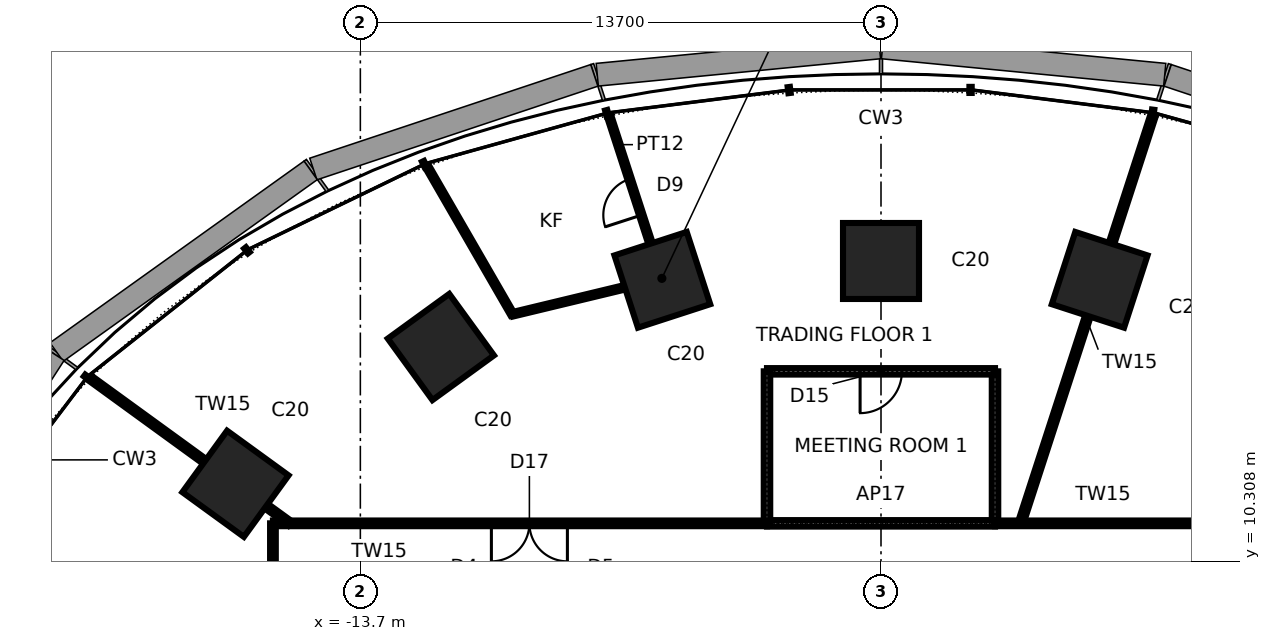
"""IFC4 building model, lengths in metres.
Left out: names, types, materials, properties, quantities, classifications, styles, units other than length and angle.
Written with IfcOpenShell. Run it as: python <this file> out.ifc"""

import sys

from ifc_helpers import new_model, si_unit, direction, frame, frame_2d, origin, origin_2d, place, context, subcontext, project, spatial, rectangle, extrude, element, fill, save


model = new_model("IFC4")
c1 = context("Model", 3, precision=1e-05, world=origin(), true_north=direction((0.0, 1.0)))
c2 = subcontext(c1, "Body", "Model", "MODEL_VIEW")
j1 = project(units=[si_unit("LENGTHUNIT", "METRE"), si_unit("PLANEANGLEUNIT", "RADIAN")], contexts=[c1])
p1 = place(None, origin())
s1 = spatial("IfcSite", under=j1, at=p1, CompositionType="ELEMENT")
p2 = place(p1, origin())
s2 = spatial("IfcBuilding", under=s1, at=p2, CompositionType="ELEMENT")
p3 = place(p2, frame((0.0, 0.0, 65.8)))
s3 = spatial("IfcBuildingStorey", under=s2, at=p3, CompositionType="ELEMENT", Elevation=65.8)
for number, where, z_axis, x_axis in (
    (1, (5.754, 17.708, 0.0), (0.0, 0.0, 1.0), (0.309, 0.951, 0.0)),
    (2, (0.0, 18.204, 0.0), (0.0, 0.0, 1.0), (0.0, 1.0, 0.0)),
    (3, (-5.754, 17.708, 0.0), (0.0, 0.0, 1.0), (-0.309, 0.951, 0.0)),
    (4, (-11.581, 15.94, 0.0), (0.0, 0.0, 1.0), (-0.588, 0.809, 0.0)),
    (5, (-16.986, 12.341, 0.0), (0.0, 0.0, 1.0), (-0.809, 0.588, 0.0)),
):
    element("IfcColumn", number, at=place(p3, frame(where, z_axis=z_axis, x_axis=x_axis)), inside=s3, PredefinedType="COLUMN", context=c2, shape_type="SweptSolid", body=[
        extrude(rectangle(XDim=2.0, YDim=2.0, at=origin_2d()), origin(), (0.0, 0.0, 1.0), 4.2),
    ])
p4 = place(p3, frame((16.0, 11.3, 0.0), z_axis=(0.0, 0.0, 1.0), x_axis=(-1.0, 0.0, 0.0)))
e6 = element("IfcWall", 6, at=p4, inside=s3, PredefinedType="PARTITIONING", context=c2, shape_type="SweptSolid", body=[
    extrude(rectangle(XDim=13.0, YDim=0.15, at=frame_2d((6.5, 0.0))), origin(), (0.0, 0.0, 1.0), 4.04),
])
p5 = place(p4, frame((5.164, 0.0, 0.0)))
e7 = element("IfcOpeningElement", 7, at=p5, cuts=e6, PredefinedType="OPENING", context=c2, shape_type="SweptSolid", body=[
    extrude(rectangle(XDim=2.0, YDim=2.4, at=frame_2d((1.0, 1.2))), frame((0.0, 0.085, 0.0), z_axis=(0.0, -1.0, 0.0), x_axis=(1.0, 0.0, 0.0)), (0.0, 0.0, 1.0), 0.17),
])
p6 = place(p3, frame((7.157, 22.026, 0.0), z_axis=(0.0, 0.0, 1.0), x_axis=(-0.309010203018, -0.951058722914, 0.0)))
e8 = element("IfcWall", 8, at=p6, inside=s3, PredefinedType="PARTITIONING", context=c2, shape_type="SweptSolid", body=[
    extrude(rectangle(XDim=11.278, YDim=0.15, at=frame_2d((5.639, 0.0))), origin(), (0.0, 0.0, 1.0), 2.84),
])
p7 = place(p3, frame((3.0, 11.3, 0.0), z_axis=(0.0, 0.0, 1.0), x_axis=(0.0, 1.0, 0.0)))
e9 = element("IfcWall", 9, at=p7, inside=s3, PredefinedType="PARTITIONING", context=c2, shape_type="SweptSolid", body=[
    extrude(rectangle(XDim=4.0, YDim=0.17, at=frame_2d((2.0, 0.0))), origin(), (0.0, 0.0, 1.0), 4.04),
])
p8 = place(p3, frame((-3.0, 11.3, 0.0), z_axis=(0.0, 0.0, 1.0), x_axis=(1.0, 0.0, 0.0)))
e10 = element("IfcWall", 10, at=p8, inside=s3, PredefinedType="PARTITIONING", context=c2, shape_type="SweptSolid", body=[
    extrude(rectangle(XDim=6.0, YDim=0.17, at=frame_2d((3.0, 0.0))), origin(), (0.0, 0.0, 1.0), 4.04),
])
p9 = place(p3, frame((3.0, 15.3, 0.0), z_axis=(0.0, 0.0, 1.0), x_axis=(-1.0, 0.0, 0.0)))
e11 = element("IfcWall", 11, at=p9, inside=s3, PredefinedType="PARTITIONING", context=c2, shape_type="SweptSolid", body=[
    extrude(rectangle(XDim=6.0, YDim=0.17, at=frame_2d((3.0, 0.0))), origin(), (0.0, 0.0, 1.0), 3.586),
])
p10 = place(p9, frame((2.45, 0.0, 0.0)))
e12 = element("IfcOpeningElement", 12, at=p10, cuts=e11, PredefinedType="OPENING", context=c2, shape_type="SweptSolid", body=[
    extrude(rectangle(XDim=1.1, YDim=2.4, at=frame_2d((0.55, 1.2))), frame((0.0, 0.095, 0.0), z_axis=(0.0, -1.0, 0.0), x_axis=(1.0, 0.0, 0.0)), (0.0, 0.0, 1.0), 0.19),
])
p11 = place(p3, frame((-3.0, 15.3, 0.0), z_axis=(0.0, 0.0, 1.0), x_axis=(0.0, -1.0, 0.0)))
e13 = element("IfcWall", 13, at=p11, inside=s3, PredefinedType="PARTITIONING", context=c2, shape_type="SweptSolid", body=[
    extrude(rectangle(XDim=4.0, YDim=0.17, at=frame_2d((2.0, 0.0))), origin(), (0.0, 0.0, 1.0), 4.04),
])
p12 = place(p3, frame((-5.766, 17.747, 0.0), z_axis=(0.0, 0.0, 1.0), x_axis=(-0.309024734286, 0.951054001411, 0.0)))
e14 = element("IfcWall", 14, at=p12, inside=s3, PredefinedType="PARTITIONING", context=c2, shape_type="SweptSolid", body=[
    extrude(rectangle(XDim=4.5, YDim=0.12, at=frame_2d((2.25, 0.0))), origin(), (0.0, 0.0, 1.0), 2.84),
])
p13 = place(p12, frame((1.75, 0.0, 0.0)))
e15 = element("IfcOpeningElement", 15, at=p13, cuts=e14, PredefinedType="OPENING", context=c2, shape_type="SweptSolid", body=[
    extrude(rectangle(XDim=1.0, YDim=2.4, at=frame_2d((0.5, 1.2))), frame((0.0, 0.07, 0.0), z_axis=(0.0, -1.0, 0.0), x_axis=(1.0, 0.0, 0.0)), (0.0, 0.0, 1.0), 0.14),
])
p14 = place(p3, frame((-9.699, 16.8, 0.0), z_axis=(0.0, 0.0, 1.0), x_axis=(0.972228214525, 0.23403482408, 0.0)))
e16 = element("IfcWall", 16, at=p14, inside=s3, PredefinedType="PARTITIONING", context=c2, shape_type="SweptSolid", body=[
    extrude(rectangle(XDim=4.045, YDim=0.12, at=frame_2d((2.023, 0.0))), origin(), (0.0, 0.0, 1.0), 3.04),
])
p15 = place(p3, frame((-11.949, 20.697, 0.0), z_axis=(0.0, 0.0, 1.0), x_axis=(0.500013631625, -0.866017533419, 0.0)))
e17 = element("IfcWall", 17, at=p15, inside=s3, PredefinedType="PARTITIONING", context=c2, shape_type="SweptSolid", body=[
    extrude(rectangle(XDim=4.5, YDim=0.12, at=frame_2d((2.25, 0.0))), origin(), (0.0, 0.0, 1.0), 4.04),
])
p16 = place(p3, frame((-3.0, 11.3, 0.0), z_axis=(0.0, 0.0, 1.0), x_axis=(-1.0, 0.0, 0.0)))
e18 = element("IfcWall", 18, at=p16, inside=s3, PredefinedType="PARTITIONING", context=c2, shape_type="SweptSolid", body=[
    extrude(rectangle(XDim=13.0, YDim=0.15, at=frame_2d((6.5, 0.0))), origin(), (0.0, 0.0, 1.0), 4.04),
])
p17 = place(p16, frame((5.252, 0.0, 0.0)))
e19 = element("IfcOpeningElement", 19, at=p17, cuts=e18, PredefinedType="OPENING", context=c2, shape_type="SweptSolid", body=[
    extrude(rectangle(XDim=2.0, YDim=2.4, at=frame_2d((1.0, 1.2))), frame((0.0, 0.085, 0.0), z_axis=(0.0, -1.0, 0.0), x_axis=(1.0, 0.0, 0.0)), (0.0, 0.0, 1.0), 0.17),
])
p18 = place(p3, frame((-15.553, 11.3, 0.0), z_axis=(0.0, 0.0, 1.0), x_axis=(-0.809031640451, 0.58776509317, 0.0)))
e20 = element("IfcWall", 20, at=p18, inside=s3, PredefinedType="PARTITIONING", context=c2, shape_type="SweptSolid", body=[
    extrude(rectangle(XDim=6.499, YDim=0.15, at=frame_2d((3.25, 0.0))), origin(), (0.0, 0.0, 1.0), 2.84),
])
p19 = place(p3, frame((-16.0, 11.3, 0.0), z_axis=(0.0, 0.0, 1.0), x_axis=(0.0, -1.0, 0.0)))
e21 = element("IfcWall", 21, at=p19, inside=s3, PredefinedType="PARTITIONING", context=c2, shape_type="SweptSolid", body=[
    extrude(rectangle(XDim=7.8, YDim=0.15, at=frame_2d((3.9, 0.0))), origin(), (0.0, 0.0, 1.0), 4.04),
])
p20 = place(p19, frame((2.9, 0.0, 0.0)))
e22 = element("IfcOpeningElement", 22, at=p20, cuts=e21, PredefinedType="OPENING", context=c2, shape_type="SweptSolid", body=[
    extrude(rectangle(XDim=2.0, YDim=2.4, at=frame_2d((1.0, 1.2))), frame((0.0, 0.085, 0.0), z_axis=(0.0, -1.0, 0.0), x_axis=(1.0, 0.0, 0.0)), (0.0, 0.0, 1.0), 0.17),
])
p21 = place(p13, origin())
e23 = element("IfcDoor", 23, at=p21, inside=s3, OperationType="SINGLE_SWING_LEFT", PredefinedType="DOOR", context=c2, shape_type="SweptSolid", body=[
    extrude(rectangle(XDim=1.0, YDim=2.4, at=frame_2d((0.5, 1.2))), frame((0.0, 0.025, 0.0), z_axis=(0.0, -1.0, 0.0), x_axis=(1.0, 0.0, 0.0)), (0.0, 0.0, 1.0), 0.05),
])
fill(e15, e23)
p22 = place(p10, origin())
e24 = element("IfcDoor", 24, at=p22, inside=s3, OperationType="SINGLE_SWING_RIGHT", PredefinedType="DOOR", context=c2, shape_type="SweptSolid", body=[
    extrude(rectangle(XDim=1.1, YDim=2.4, at=frame_2d((0.55, 1.2))), frame((0.0, 0.025, 0.0), z_axis=(0.0, -1.0, 0.0), x_axis=(1.0, 0.0, 0.0)), (0.0, 0.0, 1.0), 0.05),
])
fill(e12, e24)
p23 = place(p17, origin())
e25 = element("IfcDoor", 25, at=p23, inside=s3, OperationType="DOUBLE_DOOR_SINGLE_SWING", PredefinedType="DOOR", context=c2, shape_type="SweptSolid", body=[
    extrude(rectangle(XDim=2.0, YDim=2.4, at=frame_2d((1.0, 1.2))), frame((0.0, 0.025, 0.0), z_axis=(0.0, -1.0, 0.0), x_axis=(1.0, 0.0, 0.0)), (0.0, 0.0, 1.0), 0.05),
])
fill(e19, e25)
save(model, sys.argv[1])
